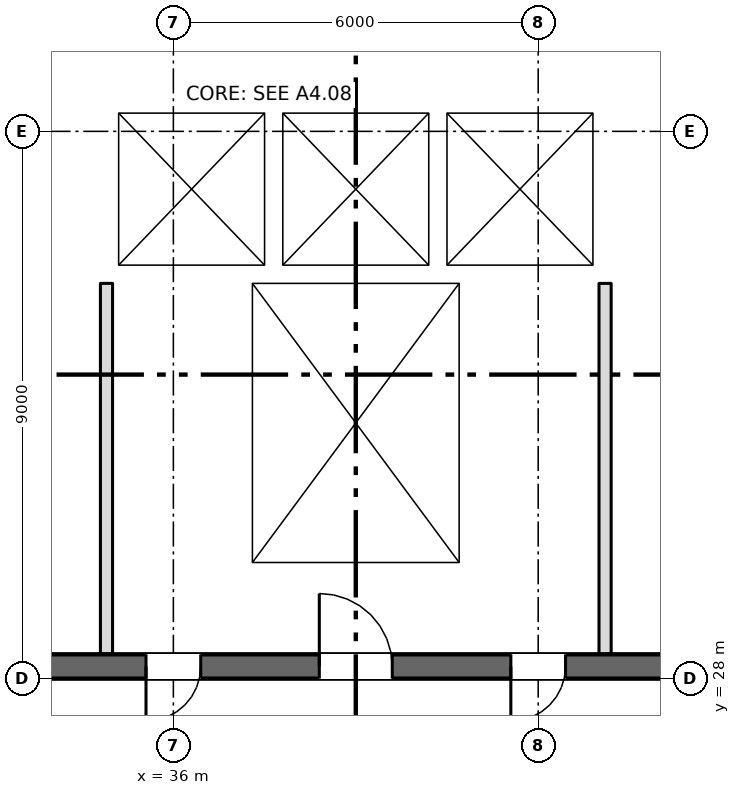
"""IFC4 building model, lengths in metres.
Left out: names, types, materials, properties, quantities, classifications, styles, units other than length and angle.
Written with IfcOpenShell. Run it as: python <this file> out.ifc"""

import sys

from ifc_helpers import new_model, si_unit, direction, frame, frame_2d, origin, place, context, subcontext, project, spatial, rectangle, extrude, element, fill, save


model = new_model("IFC4")
c1 = context("Model", 3, precision=1e-05, world=origin(), true_north=direction((0.0, 1.0)))
c2 = subcontext(c1, "Body", "Model", "MODEL_VIEW")
j1 = project(units=[si_unit("LENGTHUNIT", "METRE"), si_unit("PLANEANGLEUNIT", "RADIAN")], contexts=[c1])
p1 = place(None, origin())
s1 = spatial("IfcSite", under=j1, at=p1, CompositionType="ELEMENT")
p2 = place(p1, origin())
s2 = spatial("IfcBuilding", under=s1, at=p2, CompositionType="ELEMENT")
p3 = place(p2, frame((0.0, 0.0, 37.5)))
s3 = spatial("IfcBuildingStorey", under=s2, at=p3, CompositionType="ELEMENT", Elevation=37.5)
p4 = place(p3, frame((6.7, 28.2, 0.0), z_axis=(0.0, 0.0, 1.0), x_axis=(1.0, 0.0, 0.0)))
e1 = element("IfcWall", 1, at=p4, inside=s3, PredefinedType="SHEAR", context=c2, shape_type="SweptSolid", body=[
    extrude(rectangle(XDim=57.8, YDim=0.4, at=frame_2d((28.9, 0.0))), origin(), (0.0, 0.0, 1.0), 3.35),
])
p5 = place(p4, frame((12.062, 0.0, 0.0)))
e2 = element("IfcOpeningElement", 2, at=p5, cuts=e1, PredefinedType="OPENING", context=c2, shape_type="SweptSolid", body=[
    extrude(rectangle(XDim=0.9, YDim=2.1, at=frame_2d((0.45, 1.05))), frame((0.0, 0.21, 0.0), z_axis=(0.0, -1.0, 0.0), x_axis=(1.0, 0.0, 0.0)), (0.0, 0.0, 1.0), 0.42),
])
p6 = place(p4, frame((14.637, 0.0, 0.0)))
e3 = element("IfcOpeningElement", 3, at=p6, cuts=e1, PredefinedType="OPENING", context=c2, shape_type="SweptSolid", body=[
    extrude(rectangle(XDim=0.9, YDim=2.1, at=frame_2d((0.45, 1.05))), frame((0.0, 0.21, 0.0), z_axis=(0.0, -1.0, 0.0), x_axis=(1.0, 0.0, 0.0)), (0.0, 0.0, 1.0), 0.42),
])
p7 = place(p4, frame((49.062, 0.0, 0.0)))
e4 = element("IfcOpeningElement", 4, at=p7, cuts=e1, PredefinedType="OPENING", context=c2, shape_type="SweptSolid", body=[
    extrude(rectangle(XDim=0.9, YDim=2.1, at=frame_2d((0.45, 1.05))), frame((0.0, 0.21, 0.0), z_axis=(0.0, -1.0, 0.0), x_axis=(1.0, 0.0, 0.0)), (0.0, 0.0, 1.0), 0.42),
])
p8 = place(p4, frame((51.637, 0.0, 0.0)))
e5 = element("IfcOpeningElement", 5, at=p8, cuts=e1, PredefinedType="OPENING", context=c2, shape_type="SweptSolid", body=[
    extrude(rectangle(XDim=0.9, YDim=2.1, at=frame_2d((0.45, 1.05))), frame((0.0, 0.21, 0.0), z_axis=(0.0, -1.0, 0.0), x_axis=(1.0, 0.0, 0.0)), (0.0, 0.0, 1.0), 0.42),
])
p9 = place(p4, frame((1.35, 0.0, 0.0)))
e6 = element("IfcOpeningElement", 6, at=p9, cuts=e1, PredefinedType="OPENING", context=c2, shape_type="SweptSolid", body=[
    extrude(rectangle(XDim=0.9, YDim=2.1, at=frame_2d((0.45, 1.05))), frame((0.0, 0.21, 0.0), z_axis=(0.0, -1.0, 0.0), x_axis=(1.0, 0.0, 0.0)), (0.0, 0.0, 1.0), 0.42),
])
p10 = place(p4, frame((4.7, 0.0, 0.0)))
e7 = element("IfcOpeningElement", 7, at=p10, cuts=e1, PredefinedType="OPENING", context=c2, shape_type="SweptSolid", body=[
    extrude(rectangle(XDim=1.2, YDim=2.1, at=frame_2d((0.6, 1.05))), frame((0.0, 0.21, 0.0), z_axis=(0.0, -1.0, 0.0), x_axis=(1.0, 0.0, 0.0)), (0.0, 0.0, 1.0), 0.42),
])
p11 = place(p4, frame((31.7, 0.0, 0.0)))
e8 = element("IfcOpeningElement", 8, at=p11, cuts=e1, PredefinedType="OPENING", context=c2, shape_type="SweptSolid", body=[
    extrude(rectangle(XDim=1.2, YDim=2.1, at=frame_2d((0.6, 1.05))), frame((0.0, 0.21, 0.0), z_axis=(0.0, -1.0, 0.0), x_axis=(1.0, 0.0, 0.0)), (0.0, 0.0, 1.0), 0.42),
])
p12 = place(p4, frame((55.2, 0.0, 0.0)))
e9 = element("IfcOpeningElement", 9, at=p12, cuts=e1, PredefinedType="OPENING", context=c2, shape_type="SweptSolid", body=[
    extrude(rectangle(XDim=1.2, YDim=2.1, at=frame_2d((0.6, 1.05))), frame((0.0, 0.21, 0.0), z_axis=(0.0, -1.0, 0.0), x_axis=(1.0, 0.0, 0.0)), (0.0, 0.0, 1.0), 0.42),
])
p13 = place(p4, frame((21.7, 0.0, 0.0)))
e10 = element("IfcOpeningElement", 10, at=p13, cuts=e1, PredefinedType="OPENING", context=c2, shape_type="SweptSolid", body=[
    extrude(rectangle(XDim=1.2, YDim=2.1, at=frame_2d((0.6, 1.05))), frame((0.0, 0.21, 0.0), z_axis=(0.0, -1.0, 0.0), x_axis=(1.0, 0.0, 0.0)), (0.0, 0.0, 1.0), 0.42),
])
p14 = place(p4, frame((41.7, 0.0, 0.0)))
e11 = element("IfcOpeningElement", 11, at=p14, cuts=e1, PredefinedType="OPENING", context=c2, shape_type="SweptSolid", body=[
    extrude(rectangle(XDim=1.2, YDim=2.1, at=frame_2d((0.6, 1.05))), frame((0.0, 0.21, 0.0), z_axis=(0.0, -1.0, 0.0), x_axis=(1.0, 0.0, 0.0)), (0.0, 0.0, 1.0), 0.42),
])
p15 = place(p4, frame((24.85, 0.0, 0.0)))
e12 = element("IfcOpeningElement", 12, at=p15, cuts=e1, PredefinedType="OPENING", context=c2, shape_type="SweptSolid", body=[
    extrude(rectangle(XDim=2.4, YDim=2.1, at=frame_2d((1.2, 1.05))), frame((0.0, 0.21, 0.0), z_axis=(0.0, -1.0, 0.0), x_axis=(1.0, 0.0, 0.0)), (0.0, 0.0, 1.0), 0.42),
])
p16 = place(p4, frame((37.35, 0.0, 0.0)))
e13 = element("IfcOpeningElement", 13, at=p16, cuts=e1, PredefinedType="OPENING", context=c2, shape_type="SweptSolid", body=[
    extrude(rectangle(XDim=2.4, YDim=2.1, at=frame_2d((1.2, 1.05))), frame((0.0, 0.21, 0.0), z_axis=(0.0, -1.0, 0.0), x_axis=(1.0, 0.0, 0.0)), (0.0, 0.0, 1.0), 0.42),
])
p17 = place(p4, frame((7.85, 0.0, 0.0)))
e14 = element("IfcOpeningElement", 14, at=p17, cuts=e1, PredefinedType="OPENING", context=c2, shape_type="SweptSolid", body=[
    extrude(rectangle(XDim=2.4, YDim=2.1, at=frame_2d((1.2, 1.05))), frame((0.0, 0.21, 0.0), z_axis=(0.0, -1.0, 0.0), x_axis=(1.0, 0.0, 0.0)), (0.0, 0.0, 1.0), 0.42),
])
p18 = place(p4, frame((28.85, 0.0, 0.0)))
e15 = element("IfcOpeningElement", 15, at=p18, cuts=e1, PredefinedType="OPENING", context=c2, shape_type="SweptSolid", body=[
    extrude(rectangle(XDim=0.9, YDim=2.1, at=frame_2d((0.45, 1.05))), frame((0.0, 0.21, 0.0), z_axis=(0.0, -1.0, 0.0), x_axis=(1.0, 0.0, 0.0)), (0.0, 0.0, 1.0), 0.42),
])
p19 = place(p4, frame((34.85, 0.0, 0.0)))
e16 = element("IfcOpeningElement", 16, at=p19, cuts=e1, PredefinedType="OPENING", context=c2, shape_type="SweptSolid", body=[
    extrude(rectangle(XDim=0.9, YDim=2.1, at=frame_2d((0.45, 1.05))), frame((0.0, 0.21, 0.0), z_axis=(0.0, -1.0, 0.0), x_axis=(1.0, 0.0, 0.0)), (0.0, 0.0, 1.0), 0.42),
])
for number, where, z_axis, x_axis in (
    (17, (37.15, 28.4, 0.0), (0.0, 0.0, 1.0), (0.0, 1.0, 0.0)),
    (18, (40.85, 28.4, 0.0), (0.0, 0.0, 1.0), (0.0, 1.0, 0.0)),
):
    element("IfcWall", number, at=place(p3, frame(where, z_axis=z_axis, x_axis=x_axis)), inside=s3, PredefinedType="SHEAR", context=c2, shape_type="SweptSolid", body=[
        extrude(rectangle(XDim=6.1, YDim=0.3, at=frame_2d((3.05, 0.0))), origin(), (0.0, 0.0, 1.0), 3.35),
    ])
p20 = place(p3, frame((34.8, 34.65, 0.0), z_axis=(0.0, 0.0, 1.0), x_axis=(1.0, 0.0, 0.0)))
e19 = element("IfcWall", 19, at=p20, inside=s3, PredefinedType="SHEAR", context=c2, shape_type="SweptSolid", body=[
    extrude(rectangle(XDim=8.4, YDim=0.3, at=frame_2d((4.2, 0.0))), origin(), (0.0, 0.0, 1.0), 3.35),
])
p21 = place(p3, frame((34.8, 37.45, 0.0), z_axis=(0.0, 0.0, 1.0), x_axis=(1.0, 0.0, 0.0)))
e20 = element("IfcWall", 20, at=p21, inside=s3, PredefinedType="SHEAR", context=c2, shape_type="SweptSolid", body=[
    extrude(rectangle(XDim=8.4, YDim=0.3, at=frame_2d((4.2, 0.0))), origin(), (0.0, 0.0, 1.0), 3.35),
])
p22 = place(p21, frame((0.95, 0.0, 0.0)))
e21 = element("IfcOpeningElement", 21, at=p22, cuts=e20, PredefinedType="OPENING", context=c2, shape_type="SweptSolid", body=[
    extrude(rectangle(XDim=1.1, YDim=2.1, at=frame_2d((0.55, 1.05))), frame((0.0, 0.16, 0.0), z_axis=(0.0, -1.0, 0.0), x_axis=(1.0, 0.0, 0.0)), (0.0, 0.0, 1.0), 0.32),
])
p23 = place(p21, frame((3.65, 0.0, 0.0)))
e22 = element("IfcOpeningElement", 22, at=p23, cuts=e20, PredefinedType="OPENING", context=c2, shape_type="SweptSolid", body=[
    extrude(rectangle(XDim=1.1, YDim=2.1, at=frame_2d((0.55, 1.05))), frame((0.0, 0.16, 0.0), z_axis=(0.0, -1.0, 0.0), x_axis=(1.0, 0.0, 0.0)), (0.0, 0.0, 1.0), 0.32),
])
p24 = place(p21, frame((6.35, 0.0, 0.0)))
e23 = element("IfcOpeningElement", 23, at=p24, cuts=e20, PredefinedType="OPENING", context=c2, shape_type="SweptSolid", body=[
    extrude(rectangle(XDim=1.1, YDim=2.1, at=frame_2d((0.55, 1.05))), frame((0.0, 0.16, 0.0), z_axis=(0.0, -1.0, 0.0), x_axis=(1.0, 0.0, 0.0)), (0.0, 0.0, 1.0), 0.32),
])
for number, where, z_axis, x_axis in (
    (24, (34.95, 34.8, 0.0), (0.0, 0.0, 1.0), (0.0, 1.0, 0.0)),
    (25, (43.05, 34.8, 0.0), (0.0, 0.0, 1.0), (0.0, 1.0, 0.0)),
    (26, (37.65, 34.8, 0.0), (0.0, 0.0, 1.0), (0.0, 1.0, 0.0)),
    (27, (40.35, 34.8, 0.0), (0.0, 0.0, 1.0), (0.0, 1.0, 0.0)),
):
    element("IfcWall", number, at=place(p3, frame(where, z_axis=z_axis, x_axis=x_axis)), inside=s3, PredefinedType="SHEAR", context=c2, shape_type="SweptSolid", body=[
        extrude(rectangle(XDim=2.5, YDim=0.3, at=frame_2d((1.25, 0.0))), origin(), (0.0, 0.0, 1.0), 3.35),
    ])
for number, where, z_axis, x_axis in (
    (28, (34.9, 28.4, 0.0), (0.0, 0.0, 1.0), (0.0, 1.0, 0.0)),
    (29, (43.1, 28.4, 0.0), (0.0, 0.0, 1.0), (0.0, 1.0, 0.0)),
):
    element("IfcWall", number, at=place(p3, frame(where, z_axis=z_axis, x_axis=x_axis)), inside=s3, PredefinedType="PARTITIONING", context=c2, shape_type="SweptSolid", body=[
        extrude(rectangle(XDim=6.1, YDim=0.2, at=frame_2d((3.05, 0.0))), origin(), (0.0, 0.0, 1.0), 3.35),
    ])
p25 = place(p22, origin())
e30 = element("IfcDoor", 30, at=p25, inside=s3, OperationType="SLIDING_TO_LEFT", PredefinedType="DOOR", context=c2, shape_type="SweptSolid", body=[
    extrude(rectangle(XDim=1.1, YDim=2.1, at=frame_2d((0.55, 1.05))), frame((0.0, 0.025, 0.0), z_axis=(0.0, -1.0, 0.0), x_axis=(1.0, 0.0, 0.0)), (0.0, 0.0, 1.0), 0.05),
])
fill(e21, e30)
p26 = place(p23, origin())
e31 = element("IfcDoor", 31, at=p26, inside=s3, OperationType="SLIDING_TO_LEFT", PredefinedType="DOOR", context=c2, shape_type="SweptSolid", body=[
    extrude(rectangle(XDim=1.1, YDim=2.1, at=frame_2d((0.55, 1.05))), frame((0.0, 0.025, 0.0), z_axis=(0.0, -1.0, 0.0), x_axis=(1.0, 0.0, 0.0)), (0.0, 0.0, 1.0), 0.05),
])
fill(e22, e31)
p27 = place(p24, origin())
e32 = element("IfcDoor", 32, at=p27, inside=s3, OperationType="SLIDING_TO_LEFT", PredefinedType="DOOR", context=c2, shape_type="SweptSolid", body=[
    extrude(rectangle(XDim=1.1, YDim=2.1, at=frame_2d((0.55, 1.05))), frame((0.0, 0.025, 0.0), z_axis=(0.0, -1.0, 0.0), x_axis=(1.0, 0.0, 0.0)), (0.0, 0.0, 1.0), 0.05),
])
fill(e23, e32)
p28 = place(p11, origin())
e33 = element("IfcDoor", 33, at=p28, inside=s3, OperationType="SINGLE_SWING_LEFT", PredefinedType="DOOR", context=c2, shape_type="SweptSolid", body=[
    extrude(rectangle(XDim=1.2, YDim=2.1, at=frame_2d((0.6, 1.05))), frame((0.0, 0.025, 0.0), z_axis=(0.0, -1.0, 0.0), x_axis=(1.0, 0.0, 0.0)), (0.0, 0.0, 1.0), 0.05),
])
fill(e8, e33)
p29 = place(p18, origin())
e34 = element("IfcDoor", 34, at=p29, inside=s3, OperationType="SINGLE_SWING_LEFT", PredefinedType="DOOR", context=c2, shape_type="SweptSolid", body=[
    extrude(rectangle(XDim=0.9, YDim=2.1, at=frame_2d((0.45, 1.05))), frame((0.0, 0.025, 0.0), z_axis=(0.0, -1.0, 0.0), x_axis=(1.0, 0.0, 0.0)), (0.0, 0.0, 1.0), 0.05),
])
fill(e15, e34)
p30 = place(p19, origin())
e35 = element("IfcDoor", 35, at=p30, inside=s3, OperationType="SINGLE_SWING_LEFT", PredefinedType="DOOR", context=c2, shape_type="SweptSolid", body=[
    extrude(rectangle(XDim=0.9, YDim=2.1, at=frame_2d((0.45, 1.05))), frame((0.0, 0.025, 0.0), z_axis=(0.0, -1.0, 0.0), x_axis=(1.0, 0.0, 0.0)), (0.0, 0.0, 1.0), 0.05),
])
fill(e16, e35)
save(model, sys.argv[1])
